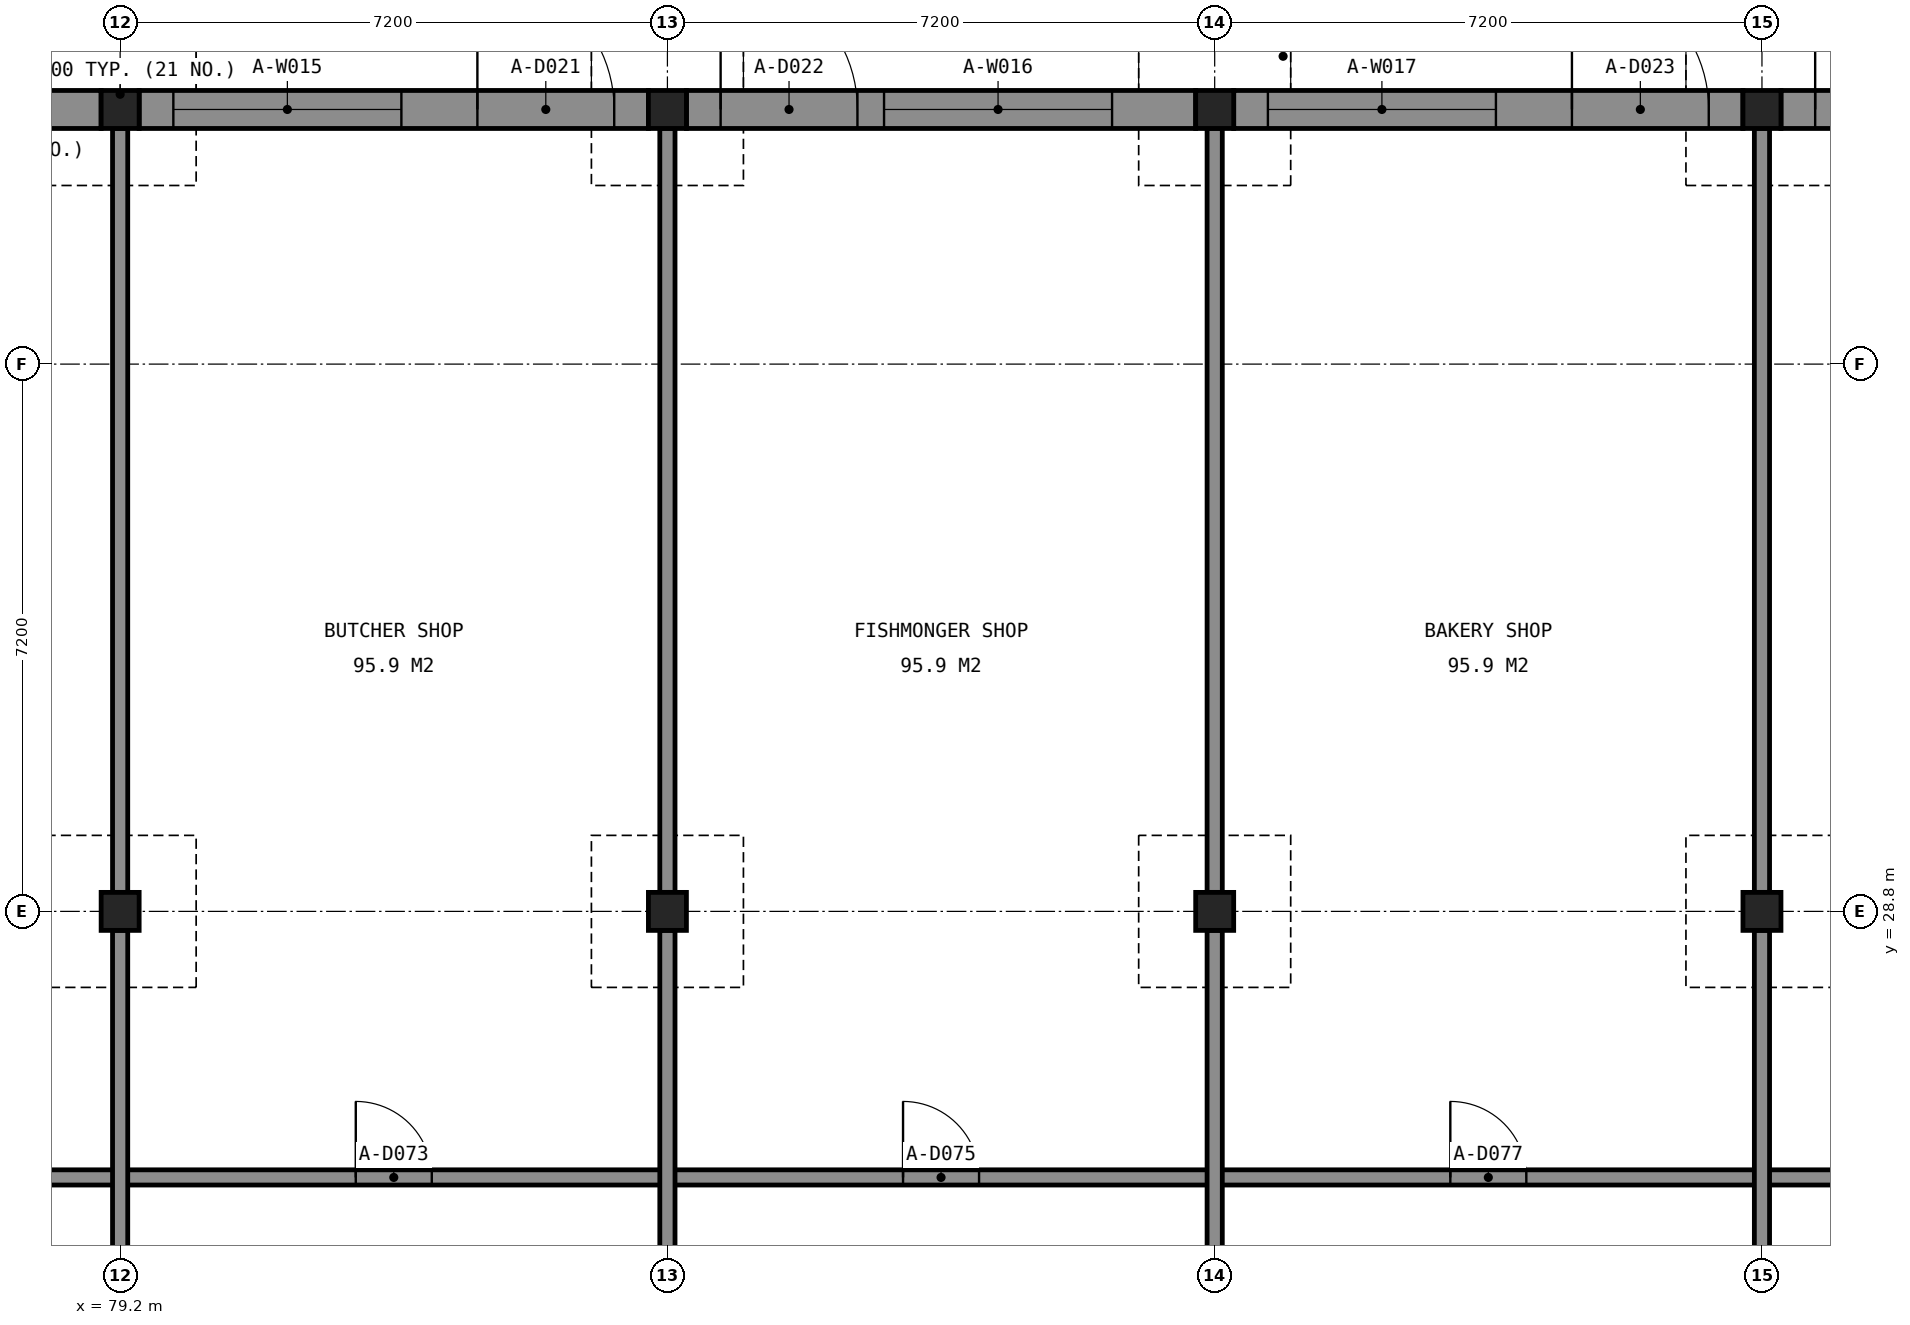
"""IFC4 building model, lengths in metres.
Left out: names, types, materials, properties, quantities, classifications, styles, units other than length and angle.
Written with IfcOpenShell. Run it as: python <this file> out.ifc"""

import sys

from ifc_helpers import new_model, si_unit, direction, frame, frame_2d, origin, origin_2d, place, context, subcontext, project, spatial, rectangle, extrude, element, fill, save


model = new_model("IFC4")
c1 = context("Model", 3, precision=1e-05, world=origin(), true_north=direction((0.0, 1.0)))
c2 = subcontext(c1, "Body", "Model", "MODEL_VIEW")
j1 = project(units=[si_unit("LENGTHUNIT", "METRE"), si_unit("PLANEANGLEUNIT", "RADIAN")], contexts=[c1])
p1 = place(None, origin())
s1 = spatial("IfcSite", under=j1, at=p1, CompositionType="ELEMENT")
p2 = place(p1, origin())
s2 = spatial("IfcBuilding", under=s1, at=p2, CompositionType="ELEMENT")
p3 = place(p2, origin())
s3 = spatial("IfcBuildingStorey", under=s2, at=p3, CompositionType="ELEMENT", Elevation=0.0)
for number, where, z_axis, x_axis in (
    (1, (79.2, 39.35, 0.0), (0.0, 0.0, 1.0), (1.0, 0.0, 0.0)),
    (2, (86.4, 39.35, 0.0), (0.0, 0.0, 1.0), (1.0, 0.0, 0.0)),
    (3, (93.6, 39.35, 0.0), (0.0, 0.0, 1.0), (1.0, 0.0, 0.0)),
    (4, (100.8, 39.35, 0.0), (0.0, 0.0, 1.0), (1.0, 0.0, 0.0)),
    (5, (79.2, 28.8, 0.0), (0.0, 0.0, 1.0), (1.0, 0.0, 0.0)),
    (6, (86.4, 28.8, 0.0), (0.0, 0.0, 1.0), (1.0, 0.0, 0.0)),
    (7, (93.6, 28.8, 0.0), (0.0, 0.0, 1.0), (1.0, 0.0, 0.0)),
    (8, (100.8, 28.8, 0.0), (0.0, 0.0, 1.0), (1.0, 0.0, 0.0)),
):
    element("IfcColumn", number, at=place(p3, frame(where, z_axis=z_axis, x_axis=x_axis)), inside=s3, PredefinedType="COLUMN", context=c2, shape_type="SweptSolid", body=[
        extrude(rectangle(XDim=0.5, YDim=0.5, at=origin_2d()), origin(), (0.0, 0.0, 1.0), 3.7),
    ])
p4 = place(p3, frame((72.25, 39.35, 0.0), z_axis=(0.0, 0.0, 1.0), x_axis=(1.0, 0.0, 0.0)))
e9 = element("IfcWall", 9, at=p4, inside=s3, PredefinedType="SOLIDWALL", context=c2, shape_type="SweptSolid", body=[
    extrude(rectangle(XDim=6.7, YDim=0.5, at=frame_2d((3.35, 0.0))), origin(), (0.0, 0.0, 1.0), 3.6),
])
p5 = place(p4, frame((0.45, 0.0, 0.0)))
e10 = element("IfcOpeningElement", 10, at=p5, cuts=e9, PredefinedType="OPENING", context=c2, shape_type="SweptSolid", body=[
    extrude(rectangle(XDim=1.8, YDim=2.4, at=frame_2d((0.9, 1.2))), frame((0.0, 0.26, 0.0), z_axis=(0.0, -1.0, 0.0), x_axis=(1.0, 0.0, 0.0)), (0.0, 0.0, 1.0), 0.52),
])
p6 = place(p4, frame((2.6, 0.0, 0.6)))
e11 = element("IfcOpeningElement", 11, at=p6, cuts=e9, PredefinedType="OPENING", context=c2, shape_type="SweptSolid", body=[
    extrude(rectangle(XDim=3.0, YDim=2.4, at=frame_2d((1.5, 1.2))), frame((0.0, 0.26, 0.0), z_axis=(0.0, -1.0, 0.0), x_axis=(1.0, 0.0, 0.0)), (0.0, 0.0, 1.0), 0.52),
])
p7 = place(p3, frame((79.45, 39.35, 0.0), z_axis=(0.0, 0.0, 1.0), x_axis=(1.0, 0.0, 0.0)))
e12 = element("IfcWall", 12, at=p7, inside=s3, PredefinedType="SOLIDWALL", context=c2, shape_type="SweptSolid", body=[
    extrude(rectangle(XDim=6.7, YDim=0.5, at=frame_2d((3.35, 0.0))), origin(), (0.0, 0.0, 1.0), 3.6),
])
p8 = place(p7, frame((4.45, 0.0, 0.0)))
e13 = element("IfcOpeningElement", 13, at=p8, cuts=e12, PredefinedType="OPENING", context=c2, shape_type="SweptSolid", body=[
    extrude(rectangle(XDim=1.8, YDim=2.4, at=frame_2d((0.9, 1.2))), frame((0.0, 0.26, 0.0), z_axis=(0.0, -1.0, 0.0), x_axis=(1.0, 0.0, 0.0)), (0.0, 0.0, 1.0), 0.52),
])
p9 = place(p7, frame((0.45, 0.0, 0.6)))
e14 = element("IfcOpeningElement", 14, at=p9, cuts=e12, PredefinedType="OPENING", context=c2, shape_type="SweptSolid", body=[
    extrude(rectangle(XDim=3.0, YDim=2.4, at=frame_2d((1.5, 1.2))), frame((0.0, 0.26, 0.0), z_axis=(0.0, -1.0, 0.0), x_axis=(1.0, 0.0, 0.0)), (0.0, 0.0, 1.0), 0.52),
])
p10 = place(p3, frame((86.65, 39.35, 0.0), z_axis=(0.0, 0.0, 1.0), x_axis=(1.0, 0.0, 0.0)))
e15 = element("IfcWall", 15, at=p10, inside=s3, PredefinedType="SOLIDWALL", context=c2, shape_type="SweptSolid", body=[
    extrude(rectangle(XDim=6.7, YDim=0.5, at=frame_2d((3.35, 0.0))), origin(), (0.0, 0.0, 1.0), 3.6),
])
p11 = place(p10, frame((0.45, 0.0, 0.0)))
e16 = element("IfcOpeningElement", 16, at=p11, cuts=e15, PredefinedType="OPENING", context=c2, shape_type="SweptSolid", body=[
    extrude(rectangle(XDim=1.8, YDim=2.4, at=frame_2d((0.9, 1.2))), frame((0.0, 0.26, 0.0), z_axis=(0.0, -1.0, 0.0), x_axis=(1.0, 0.0, 0.0)), (0.0, 0.0, 1.0), 0.52),
])
p12 = place(p10, frame((2.6, 0.0, 0.6)))
e17 = element("IfcOpeningElement", 17, at=p12, cuts=e15, PredefinedType="OPENING", context=c2, shape_type="SweptSolid", body=[
    extrude(rectangle(XDim=3.0, YDim=2.4, at=frame_2d((1.5, 1.2))), frame((0.0, 0.26, 0.0), z_axis=(0.0, -1.0, 0.0), x_axis=(1.0, 0.0, 0.0)), (0.0, 0.0, 1.0), 0.52),
])
p13 = place(p3, frame((93.85, 39.35, 0.0), z_axis=(0.0, 0.0, 1.0), x_axis=(1.0, 0.0, 0.0)))
e18 = element("IfcWall", 18, at=p13, inside=s3, PredefinedType="SOLIDWALL", context=c2, shape_type="SweptSolid", body=[
    extrude(rectangle(XDim=6.7, YDim=0.5, at=frame_2d((3.35, 0.0))), origin(), (0.0, 0.0, 1.0), 3.6),
])
p14 = place(p13, frame((4.45, 0.0, 0.0)))
e19 = element("IfcOpeningElement", 19, at=p14, cuts=e18, PredefinedType="OPENING", context=c2, shape_type="SweptSolid", body=[
    extrude(rectangle(XDim=1.8, YDim=2.4, at=frame_2d((0.9, 1.2))), frame((0.0, 0.26, 0.0), z_axis=(0.0, -1.0, 0.0), x_axis=(1.0, 0.0, 0.0)), (0.0, 0.0, 1.0), 0.52),
])
p15 = place(p13, frame((0.45, 0.0, 0.6)))
e20 = element("IfcOpeningElement", 20, at=p15, cuts=e18, PredefinedType="OPENING", context=c2, shape_type="SweptSolid", body=[
    extrude(rectangle(XDim=3.0, YDim=2.4, at=frame_2d((1.5, 1.2))), frame((0.0, 0.26, 0.0), z_axis=(0.0, -1.0, 0.0), x_axis=(1.0, 0.0, 0.0)), (0.0, 0.0, 1.0), 0.52),
])
p16 = place(p3, frame((101.05, 39.35, 0.0), z_axis=(0.0, 0.0, 1.0), x_axis=(1.0, 0.0, 0.0)))
e21 = element("IfcWall", 21, at=p16, inside=s3, PredefinedType="SOLIDWALL", context=c2, shape_type="SweptSolid", body=[
    extrude(rectangle(XDim=6.7, YDim=0.5, at=frame_2d((3.35, 0.0))), origin(), (0.0, 0.0, 1.0), 3.6),
])
p17 = place(p16, frame((0.45, 0.0, 0.0)))
e22 = element("IfcOpeningElement", 22, at=p17, cuts=e21, PredefinedType="OPENING", context=c2, shape_type="SweptSolid", body=[
    extrude(rectangle(XDim=1.8, YDim=2.4, at=frame_2d((0.9, 1.2))), frame((0.0, 0.26, 0.0), z_axis=(0.0, -1.0, 0.0), x_axis=(1.0, 0.0, 0.0)), (0.0, 0.0, 1.0), 0.52),
])
p18 = place(p16, frame((2.6, 0.0, 0.6)))
e23 = element("IfcOpeningElement", 23, at=p18, cuts=e21, PredefinedType="OPENING", context=c2, shape_type="SweptSolid", body=[
    extrude(rectangle(XDim=3.0, YDim=2.4, at=frame_2d((1.5, 1.2))), frame((0.0, 0.26, 0.0), z_axis=(0.0, -1.0, 0.0), x_axis=(1.0, 0.0, 0.0)), (0.0, 0.0, 1.0), 0.52),
])
p19 = place(p3, frame((57.7, 25.3, 0.0), z_axis=(0.0, 0.0, 1.0), x_axis=(1.0, 0.0, 0.0)))
e24 = element("IfcWall", 24, at=p19, inside=s3, PredefinedType="PARTITIONING", context=c2, shape_type="SweptSolid", body=[
    extrude(rectangle(XDim=86.2, YDim=0.2, at=frame_2d((43.1, 0.0))), origin(), (0.0, 0.0, 1.0), 3.5),
])
p20 = place(p19, frame((3.0, 0.0, 0.0)))
e25 = element("IfcOpeningElement", 25, at=p20, cuts=e24, PredefinedType="OPENING", context=c2, shape_type="SweptSolid", body=[
    extrude(rectangle(XDim=1.0, YDim=2.1, at=frame_2d((0.5, 1.05))), frame((0.0, 0.11, 0.0), z_axis=(0.0, -1.0, 0.0), x_axis=(1.0, 0.0, 0.0)), (0.0, 0.0, 1.0), 0.22),
])
p21 = place(p19, frame((10.2, 0.0, 0.0)))
e26 = element("IfcOpeningElement", 26, at=p21, cuts=e24, PredefinedType="OPENING", context=c2, shape_type="SweptSolid", body=[
    extrude(rectangle(XDim=1.0, YDim=2.1, at=frame_2d((0.5, 1.05))), frame((0.0, 0.11, 0.0), z_axis=(0.0, -1.0, 0.0), x_axis=(1.0, 0.0, 0.0)), (0.0, 0.0, 1.0), 0.22),
])
p22 = place(p19, frame((17.4, 0.0, 0.0)))
e27 = element("IfcOpeningElement", 27, at=p22, cuts=e24, PredefinedType="OPENING", context=c2, shape_type="SweptSolid", body=[
    extrude(rectangle(XDim=1.0, YDim=2.1, at=frame_2d((0.5, 1.05))), frame((0.0, 0.11, 0.0), z_axis=(0.0, -1.0, 0.0), x_axis=(1.0, 0.0, 0.0)), (0.0, 0.0, 1.0), 0.22),
])
p23 = place(p19, frame((24.6, 0.0, 0.0)))
e28 = element("IfcOpeningElement", 28, at=p23, cuts=e24, PredefinedType="OPENING", context=c2, shape_type="SweptSolid", body=[
    extrude(rectangle(XDim=1.0, YDim=2.1, at=frame_2d((0.5, 1.05))), frame((0.0, 0.11, 0.0), z_axis=(0.0, -1.0, 0.0), x_axis=(1.0, 0.0, 0.0)), (0.0, 0.0, 1.0), 0.22),
])
p24 = place(p19, frame((31.8, 0.0, 0.0)))
e29 = element("IfcOpeningElement", 29, at=p24, cuts=e24, PredefinedType="OPENING", context=c2, shape_type="SweptSolid", body=[
    extrude(rectangle(XDim=1.0, YDim=2.1, at=frame_2d((0.5, 1.05))), frame((0.0, 0.11, 0.0), z_axis=(0.0, -1.0, 0.0), x_axis=(1.0, 0.0, 0.0)), (0.0, 0.0, 1.0), 0.22),
])
p25 = place(p19, frame((39.0, 0.0, 0.0)))
e30 = element("IfcOpeningElement", 30, at=p25, cuts=e24, PredefinedType="OPENING", context=c2, shape_type="SweptSolid", body=[
    extrude(rectangle(XDim=1.0, YDim=2.1, at=frame_2d((0.5, 1.05))), frame((0.0, 0.11, 0.0), z_axis=(0.0, -1.0, 0.0), x_axis=(1.0, 0.0, 0.0)), (0.0, 0.0, 1.0), 0.22),
])
p26 = place(p19, frame((46.2, 0.0, 0.0)))
e31 = element("IfcOpeningElement", 31, at=p26, cuts=e24, PredefinedType="OPENING", context=c2, shape_type="SweptSolid", body=[
    extrude(rectangle(XDim=1.0, YDim=2.1, at=frame_2d((0.5, 1.05))), frame((0.0, 0.11, 0.0), z_axis=(0.0, -1.0, 0.0), x_axis=(1.0, 0.0, 0.0)), (0.0, 0.0, 1.0), 0.22),
])
p27 = place(p19, frame((53.4, 0.0, 0.0)))
e32 = element("IfcOpeningElement", 32, at=p27, cuts=e24, PredefinedType="OPENING", context=c2, shape_type="SweptSolid", body=[
    extrude(rectangle(XDim=1.0, YDim=2.1, at=frame_2d((0.5, 1.05))), frame((0.0, 0.11, 0.0), z_axis=(0.0, -1.0, 0.0), x_axis=(1.0, 0.0, 0.0)), (0.0, 0.0, 1.0), 0.22),
])
p28 = place(p19, frame((60.6, 0.0, 0.0)))
e33 = element("IfcOpeningElement", 33, at=p28, cuts=e24, PredefinedType="OPENING", context=c2, shape_type="SweptSolid", body=[
    extrude(rectangle(XDim=1.0, YDim=2.1, at=frame_2d((0.5, 1.05))), frame((0.0, 0.11, 0.0), z_axis=(0.0, -1.0, 0.0), x_axis=(1.0, 0.0, 0.0)), (0.0, 0.0, 1.0), 0.22),
])
p29 = place(p19, frame((67.8, 0.0, 0.0)))
e34 = element("IfcOpeningElement", 34, at=p29, cuts=e24, PredefinedType="OPENING", context=c2, shape_type="SweptSolid", body=[
    extrude(rectangle(XDim=1.0, YDim=2.1, at=frame_2d((0.5, 1.05))), frame((0.0, 0.11, 0.0), z_axis=(0.0, -1.0, 0.0), x_axis=(1.0, 0.0, 0.0)), (0.0, 0.0, 1.0), 0.22),
])
p30 = place(p19, frame((75.0, 0.0, 0.0)))
e35 = element("IfcOpeningElement", 35, at=p30, cuts=e24, PredefinedType="OPENING", context=c2, shape_type="SweptSolid", body=[
    extrude(rectangle(XDim=1.0, YDim=2.1, at=frame_2d((0.5, 1.05))), frame((0.0, 0.11, 0.0), z_axis=(0.0, -1.0, 0.0), x_axis=(1.0, 0.0, 0.0)), (0.0, 0.0, 1.0), 0.22),
])
p31 = place(p19, frame((84.65, 0.0, 0.0)))
e36 = element("IfcOpeningElement", 36, at=p31, cuts=e24, PredefinedType="OPENING", context=c2, shape_type="SweptSolid", body=[
    extrude(rectangle(XDim=0.9, YDim=2.1, at=frame_2d((0.45, 1.05))), frame((0.0, 0.11, 0.0), z_axis=(0.0, -1.0, 0.0), x_axis=(1.0, 0.0, 0.0)), (0.0, 0.0, 1.0), 0.22),
])
p32 = place(p3, frame((79.2, 20.6, 0.0), z_axis=(0.0, 0.0, 1.0), x_axis=(0.0, 1.0, 0.0)))
e37 = element("IfcWall", 37, at=p32, inside=s3, PredefinedType="PARTITIONING", context=c2, shape_type="SweptSolid", body=[
    extrude(rectangle(XDim=7.95, YDim=0.2, at=frame_2d((3.975, 0.0))), origin(), (0.0, 0.0, 1.0), 3.5),
])
p33 = place(p3, frame((79.2, 29.05, 0.0), z_axis=(0.0, 0.0, 1.0), x_axis=(0.0, 1.0, 0.0)))
e38 = element("IfcWall", 38, at=p33, inside=s3, PredefinedType="PARTITIONING", context=c2, shape_type="SweptSolid", body=[
    extrude(rectangle(XDim=10.05, YDim=0.2, at=frame_2d((5.025, 0.0))), origin(), (0.0, 0.0, 1.0), 3.5),
])
p34 = place(p3, frame((86.4, 20.6, 0.0), z_axis=(0.0, 0.0, 1.0), x_axis=(0.0, 1.0, 0.0)))
e39 = element("IfcWall", 39, at=p34, inside=s3, PredefinedType="PARTITIONING", context=c2, shape_type="SweptSolid", body=[
    extrude(rectangle(XDim=7.95, YDim=0.2, at=frame_2d((3.975, 0.0))), origin(), (0.0, 0.0, 1.0), 3.5),
])
p35 = place(p3, frame((86.4, 29.05, 0.0), z_axis=(0.0, 0.0, 1.0), x_axis=(0.0, 1.0, 0.0)))
e40 = element("IfcWall", 40, at=p35, inside=s3, PredefinedType="PARTITIONING", context=c2, shape_type="SweptSolid", body=[
    extrude(rectangle(XDim=10.05, YDim=0.2, at=frame_2d((5.025, 0.0))), origin(), (0.0, 0.0, 1.0), 3.5),
])
p36 = place(p3, frame((93.6, 20.6, 0.0), z_axis=(0.0, 0.0, 1.0), x_axis=(0.0, 1.0, 0.0)))
e41 = element("IfcWall", 41, at=p36, inside=s3, PredefinedType="PARTITIONING", context=c2, shape_type="SweptSolid", body=[
    extrude(rectangle(XDim=7.95, YDim=0.2, at=frame_2d((3.975, 0.0))), origin(), (0.0, 0.0, 1.0), 3.5),
])
p37 = place(p3, frame((93.6, 29.05, 0.0), z_axis=(0.0, 0.0, 1.0), x_axis=(0.0, 1.0, 0.0)))
e42 = element("IfcWall", 42, at=p37, inside=s3, PredefinedType="PARTITIONING", context=c2, shape_type="SweptSolid", body=[
    extrude(rectangle(XDim=10.05, YDim=0.2, at=frame_2d((5.025, 0.0))), origin(), (0.0, 0.0, 1.0), 3.5),
])
p38 = place(p3, frame((100.8, 20.6, 0.0), z_axis=(0.0, 0.0, 1.0), x_axis=(0.0, 1.0, 0.0)))
e43 = element("IfcWall", 43, at=p38, inside=s3, PredefinedType="PARTITIONING", context=c2, shape_type="SweptSolid", body=[
    extrude(rectangle(XDim=7.95, YDim=0.2, at=frame_2d((3.975, 0.0))), origin(), (0.0, 0.0, 1.0), 3.5),
])
p39 = place(p3, frame((100.8, 29.05, 0.0), z_axis=(0.0, 0.0, 1.0), x_axis=(0.0, 1.0, 0.0)))
e44 = element("IfcWall", 44, at=p39, inside=s3, PredefinedType="PARTITIONING", context=c2, shape_type="SweptSolid", body=[
    extrude(rectangle(XDim=10.05, YDim=0.2, at=frame_2d((5.025, 0.0))), origin(), (0.0, 0.0, 1.0), 3.5),
])
p40 = place(p8, origin())
e45 = element("IfcDoor", 45, at=p40, inside=s3, OperationType="DOUBLE_DOOR_DOUBLE_SWING", PredefinedType="DOOR", context=c2, shape_type="SweptSolid", body=[
    extrude(rectangle(XDim=1.8, YDim=2.4, at=frame_2d((0.9, 1.2))), frame((0.0, 0.025, 0.0), z_axis=(0.0, -1.0, 0.0), x_axis=(1.0, 0.0, 0.0)), (0.0, 0.0, 1.0), 0.05),
])
fill(e13, e45)
p41 = place(p9, origin())
e46 = element("IfcWindow", 46, at=p41, inside=s3, PartitioningType="SINGLE_PANEL", PredefinedType="WINDOW", context=c2, shape_type="SweptSolid", body=[
    extrude(rectangle(XDim=3.0, YDim=2.4, at=frame_2d((1.5, 1.2))), frame((0.0, 0.03, 0.0), z_axis=(0.0, -1.0, 0.0), x_axis=(1.0, 0.0, 0.0)), (0.0, 0.0, 1.0), 0.06),
])
fill(e14, e46)
p42 = place(p11, origin())
e47 = element("IfcDoor", 47, at=p42, inside=s3, OperationType="DOUBLE_DOOR_DOUBLE_SWING", PredefinedType="DOOR", context=c2, shape_type="SweptSolid", body=[
    extrude(rectangle(XDim=1.8, YDim=2.4, at=frame_2d((0.9, 1.2))), frame((0.0, 0.025, 0.0), z_axis=(0.0, -1.0, 0.0), x_axis=(1.0, 0.0, 0.0)), (0.0, 0.0, 1.0), 0.05),
])
fill(e16, e47)
p43 = place(p12, origin())
e48 = element("IfcWindow", 48, at=p43, inside=s3, PartitioningType="SINGLE_PANEL", PredefinedType="WINDOW", context=c2, shape_type="SweptSolid", body=[
    extrude(rectangle(XDim=3.0, YDim=2.4, at=frame_2d((1.5, 1.2))), frame((0.0, 0.03, 0.0), z_axis=(0.0, -1.0, 0.0), x_axis=(1.0, 0.0, 0.0)), (0.0, 0.0, 1.0), 0.06),
])
fill(e17, e48)
p44 = place(p14, origin())
e49 = element("IfcDoor", 49, at=p44, inside=s3, OperationType="DOUBLE_DOOR_DOUBLE_SWING", PredefinedType="DOOR", context=c2, shape_type="SweptSolid", body=[
    extrude(rectangle(XDim=1.8, YDim=2.4, at=frame_2d((0.9, 1.2))), frame((0.0, 0.025, 0.0), z_axis=(0.0, -1.0, 0.0), x_axis=(1.0, 0.0, 0.0)), (0.0, 0.0, 1.0), 0.05),
])
fill(e19, e49)
p45 = place(p15, origin())
e50 = element("IfcWindow", 50, at=p45, inside=s3, PartitioningType="SINGLE_PANEL", PredefinedType="WINDOW", context=c2, shape_type="SweptSolid", body=[
    extrude(rectangle(XDim=3.0, YDim=2.4, at=frame_2d((1.5, 1.2))), frame((0.0, 0.03, 0.0), z_axis=(0.0, -1.0, 0.0), x_axis=(1.0, 0.0, 0.0)), (0.0, 0.0, 1.0), 0.06),
])
fill(e20, e50)
p46 = place(p17, origin())
e51 = element("IfcDoor", 51, at=p46, inside=s3, OperationType="DOUBLE_DOOR_DOUBLE_SWING", PredefinedType="DOOR", context=c2, shape_type="SweptSolid", body=[
    extrude(rectangle(XDim=1.8, YDim=2.4, at=frame_2d((0.9, 1.2))), frame((0.0, 0.025, 0.0), z_axis=(0.0, -1.0, 0.0), x_axis=(1.0, 0.0, 0.0)), (0.0, 0.0, 1.0), 0.05),
])
fill(e22, e51)
p47 = place(p23, origin())
e52 = element("IfcDoor", 52, at=p47, inside=s3, OperationType="SINGLE_SWING_LEFT", PredefinedType="DOOR", context=c2, shape_type="SweptSolid", body=[
    extrude(rectangle(XDim=1.0, YDim=2.1, at=frame_2d((0.5, 1.05))), frame((0.0, 0.025, 0.0), z_axis=(0.0, -1.0, 0.0), x_axis=(1.0, 0.0, 0.0)), (0.0, 0.0, 1.0), 0.05),
])
fill(e28, e52)
p48 = place(p24, origin())
e53 = element("IfcDoor", 53, at=p48, inside=s3, OperationType="SINGLE_SWING_LEFT", PredefinedType="DOOR", context=c2, shape_type="SweptSolid", body=[
    extrude(rectangle(XDim=1.0, YDim=2.1, at=frame_2d((0.5, 1.05))), frame((0.0, 0.025, 0.0), z_axis=(0.0, -1.0, 0.0), x_axis=(1.0, 0.0, 0.0)), (0.0, 0.0, 1.0), 0.05),
])
fill(e29, e53)
p49 = place(p25, origin())
e54 = element("IfcDoor", 54, at=p49, inside=s3, OperationType="SINGLE_SWING_LEFT", PredefinedType="DOOR", context=c2, shape_type="SweptSolid", body=[
    extrude(rectangle(XDim=1.0, YDim=2.1, at=frame_2d((0.5, 1.05))), frame((0.0, 0.025, 0.0), z_axis=(0.0, -1.0, 0.0), x_axis=(1.0, 0.0, 0.0)), (0.0, 0.0, 1.0), 0.05),
])
fill(e30, e54)
save(model, sys.argv[1])
